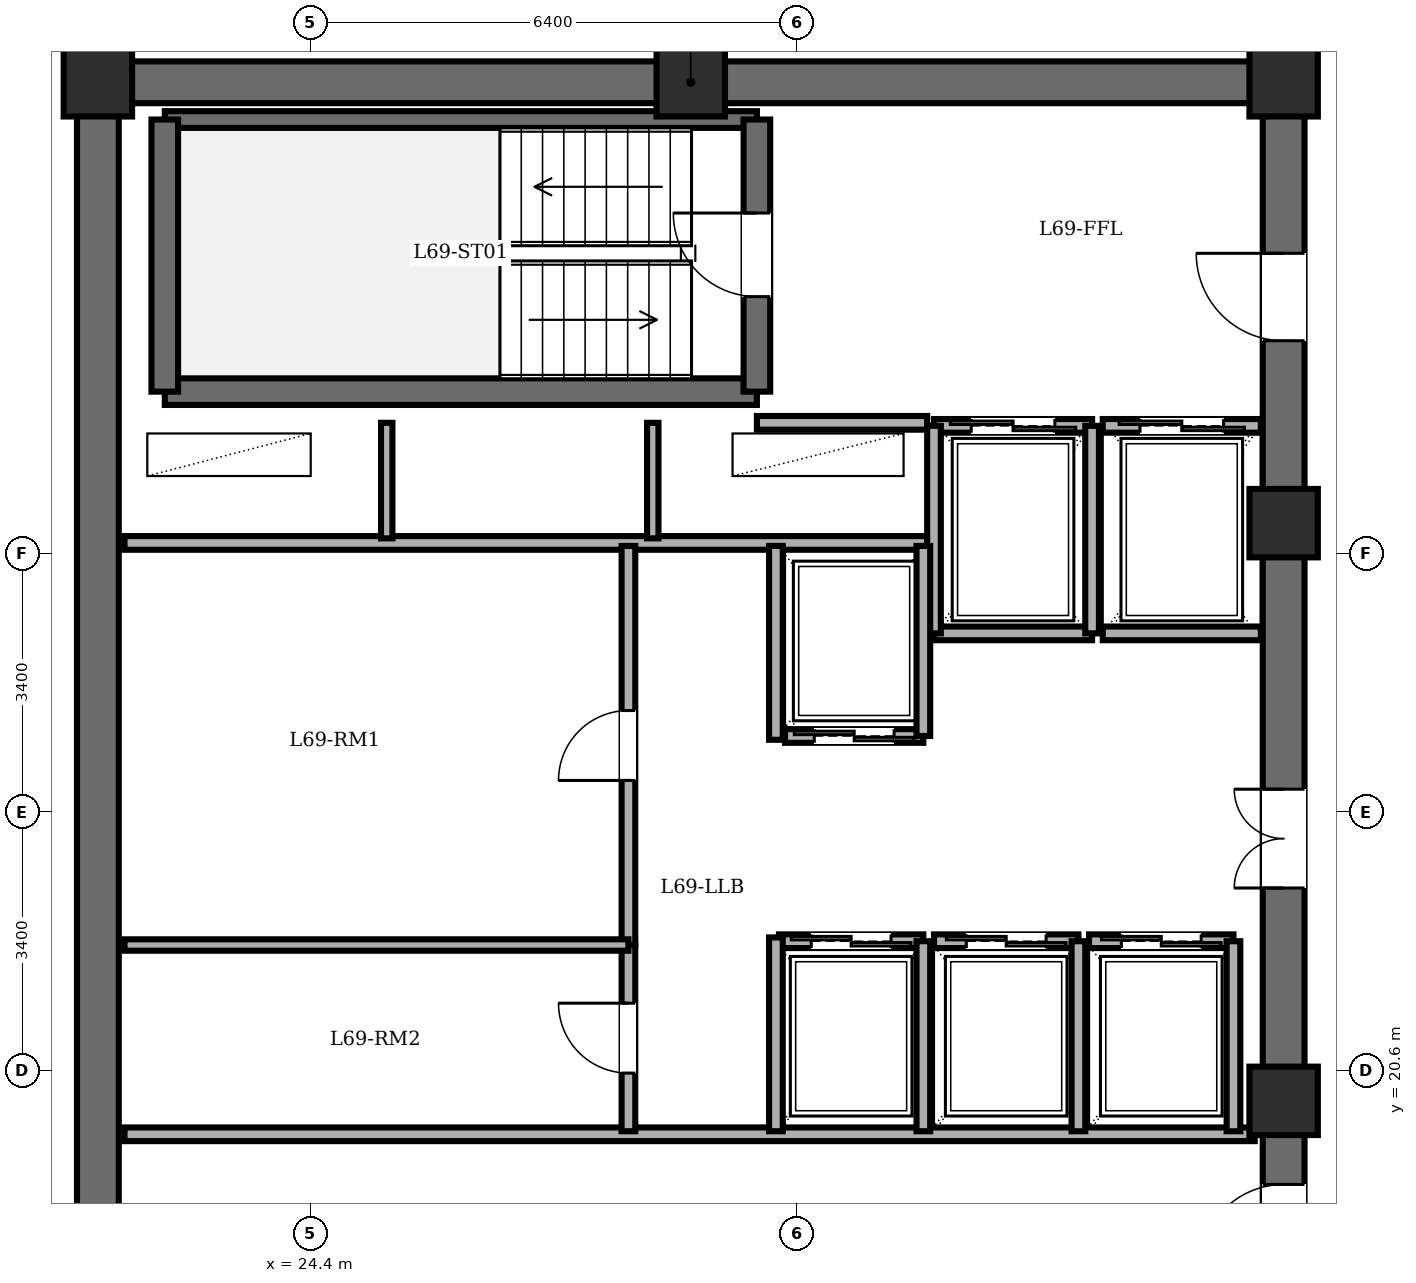
"""IFC4 building model, lengths in metres.
Left out: names, types, materials, properties, quantities, classifications, styles, units other than length and angle.
Written with IfcOpenShell. Run it as: python <this file> out.ifc"""

import sys

from ifc_helpers import new_model, si_unit, direction, frame, frame_2d, origin, origin_2d, place, context, subcontext, project, spatial, rectangle, extrude, element, fill, save


model = new_model("IFC4")
c1 = context("Model", 3, precision=1e-05, world=origin(), true_north=direction((0.0, 1.0)))
c2 = subcontext(c1, "Body", "Model", "MODEL_VIEW")
j1 = project(units=[si_unit("LENGTHUNIT", "METRE"), si_unit("PLANEANGLEUNIT", "RADIAN")], contexts=[c1])
p1 = place(None, origin())
s1 = spatial("IfcSite", under=j1, at=p1, CompositionType="ELEMENT")
p2 = place(p1, origin())
s2 = spatial("IfcBuilding", under=s1, at=p2, CompositionType="ELEMENT")
p3 = place(p2, frame((0.0, 0.0, 266.1)))
s3 = spatial("IfcBuildingStorey", under=s2, at=p3, CompositionType="ELEMENT", Elevation=266.1)
for number, where, z_axis, x_axis in (
    (1, (37.2, 20.2, 0.0), (0.0, 0.0, 1.0), (1.0, 0.0, 0.0)),
    (2, (37.2, 27.8, 0.0), (0.0, 0.0, 1.0), (1.0, 0.0, 0.0)),
    (3, (37.2, 33.6, 0.0), (0.0, 0.0, 1.0), (1.0, 0.0, 0.0)),
    (4, (29.4, 33.6, 0.0), (0.0, 0.0, 1.0), (1.0, 0.0, 0.0)),
    (5, (21.6, 33.6, 0.0), (0.0, 0.0, 1.0), (1.0, 0.0, 0.0)),
):
    element("IfcColumn", number, at=place(p3, frame(where, z_axis=z_axis, x_axis=x_axis)), inside=s3, PredefinedType="COLUMN", context=c2, shape_type="SweptSolid", body=[
        extrude(rectangle(XDim=0.9, YDim=0.9, at=origin_2d()), origin(), (0.0, 0.0, 1.0), 3.65),
    ])
p4 = place(p3, frame((21.6, 14.4, 0.0), z_axis=(0.0, 0.0, 1.0), x_axis=(0.0, 1.0, 0.0)))
e6 = element("IfcWall", 6, at=p4, inside=s3, PredefinedType="SHEAR", context=c2, shape_type="SweptSolid", body=[
    extrude(rectangle(XDim=19.2, YDim=0.55, at=frame_2d((9.6, 0.0))), origin(), (0.0, 0.0, 1.0), 3.45),
])
p5 = place(p3, frame((21.6, 33.6, 0.0), z_axis=(0.0, 0.0, 1.0), x_axis=(1.0, 0.0, 0.0)))
e7 = element("IfcWall", 7, at=p5, inside=s3, PredefinedType="SHEAR", context=c2, shape_type="SweptSolid", body=[
    extrude(rectangle(XDim=15.6, YDim=0.55, at=frame_2d((7.8, 0.0))), origin(), (0.0, 0.0, 1.0), 3.45),
])
p6 = place(p3, frame((37.2, 14.4, 0.0), z_axis=(0.0, 0.0, 1.0), x_axis=(0.0, 1.0, 0.0)))
e8 = element("IfcWall", 8, at=p6, inside=s3, PredefinedType="SHEAR", context=c2, shape_type="SweptSolid", body=[
    extrude(rectangle(XDim=19.2, YDim=0.55, at=frame_2d((9.6, 0.0))), origin(), (0.0, 0.0, 1.0), 3.45),
])
p7 = place(p6, frame((15.8, 0.0, 0.0)))
e9 = element("IfcOpeningElement", 9, at=p7, cuts=e8, PredefinedType="OPENING", context=c2, shape_type="SweptSolid", body=[
    extrude(rectangle(XDim=1.15, YDim=2.15, at=frame_2d((0.575, 1.075))), frame((0.0, 0.285, 0.0), z_axis=(0.0, -1.0, 0.0), x_axis=(1.0, 0.0, 0.0)), (0.0, 0.0, 1.0), 0.57),
])
p8 = place(p6, frame((3.6, 0.0, 0.0)))
e10 = element("IfcOpeningElement", 10, at=p8, cuts=e8, PredefinedType="OPENING", context=c2, shape_type="SweptSolid", body=[
    extrude(rectangle(XDim=1.1, YDim=2.15, at=frame_2d((0.55, 1.075))), frame((0.0, 0.285, 0.0), z_axis=(0.0, -1.0, 0.0), x_axis=(1.0, 0.0, 0.0)), (0.0, 0.0, 1.0), 0.57),
])
p9 = place(p6, frame((8.6, 0.0, 0.0)))
e11 = element("IfcOpeningElement", 11, at=p9, cuts=e8, PredefinedType="OPENING", context=c2, shape_type="SweptSolid", body=[
    extrude(rectangle(XDim=1.3, YDim=2.2, at=frame_2d((0.65, 1.1))), frame((0.0, 0.285, 0.0), z_axis=(0.0, -1.0, 0.0), x_axis=(1.0, 0.0, 0.0)), (0.0, 0.0, 1.0), 0.57),
])
p10 = place(p3, frame((22.48, 29.53, 0.0), z_axis=(0.0, 0.0, 1.0), x_axis=(1.0, 0.0, 0.0)))
e12 = element("IfcWall", 12, at=p10, inside=s3, PredefinedType="SOLIDWALL", context=c2, shape_type="SweptSolid", body=[
    extrude(rectangle(XDim=7.79, YDim=0.35, at=frame_2d((3.895, 0.0))), origin(), (0.0, 0.0, 1.0), 3.45),
])
p11 = place(p3, frame((22.48, 33.11, 0.0), z_axis=(0.0, 0.0, 1.0), x_axis=(1.0, 0.0, 0.0)))
e13 = element("IfcWall", 13, at=p11, inside=s3, PredefinedType="PARTITIONING", context=c2, shape_type="SweptSolid", body=[
    extrude(rectangle(XDim=7.79, YDim=0.22, at=frame_2d((3.895, 0.0))), origin(), (0.0, 0.0, 1.0), 3.45),
])
p12 = place(p3, frame((22.48, 29.53, 0.0), z_axis=(0.0, 0.0, 1.0), x_axis=(0.0, 1.0, 0.0)))
e14 = element("IfcWall", 14, at=p12, inside=s3, PredefinedType="SOLIDWALL", context=c2, shape_type="SweptSolid", body=[
    extrude(rectangle(XDim=3.58, YDim=0.35, at=frame_2d((1.79, 0.0))), origin(), (0.0, 0.0, 1.0), 3.45),
])
p13 = place(p3, frame((30.27, 29.53, 0.0), z_axis=(0.0, 0.0, 1.0), x_axis=(0.0, 1.0, 0.0)))
e15 = element("IfcWall", 15, at=p13, inside=s3, PredefinedType="SOLIDWALL", context=c2, shape_type="SweptSolid", body=[
    extrude(rectangle(XDim=3.58, YDim=0.35, at=frame_2d((1.79, 0.0))), origin(), (0.0, 0.0, 1.0), 3.45),
])
p14 = place(p13, frame((1.25, 0.0, 0.0)))
e16 = element("IfcOpeningElement", 16, at=p14, cuts=e15, PredefinedType="OPENING", context=c2, shape_type="SweptSolid", body=[
    extrude(rectangle(XDim=1.1, YDim=2.15, at=frame_2d((0.55, 1.075))), frame((0.0, 0.185, 0.0), z_axis=(0.0, -1.0, 0.0), x_axis=(1.0, 0.0, 0.0)), (0.0, 0.0, 1.0), 0.37),
])
p15 = place(p3, frame((30.27, 29.12, 0.0), z_axis=(0.0, 0.0, 1.0), x_axis=(1.0, 0.0, 0.0)))
e17 = element("IfcWall", 17, at=p15, inside=s3, PredefinedType="PARTITIONING", context=c2, shape_type="SweptSolid", body=[
    extrude(rectangle(XDim=2.24, YDim=0.18, at=frame_2d((1.12, 0.0))), origin(), (0.0, 0.0, 1.0), 3.45),
])
p16 = place(p3, frame((21.95, 27.54, 0.0), z_axis=(0.0, 0.0, 1.0), x_axis=(1.0, 0.0, 0.0)))
e18 = element("IfcWall", 18, at=p16, inside=s3, PredefinedType="PARTITIONING", context=c2, shape_type="SweptSolid", body=[
    extrude(rectangle(XDim=10.56, YDim=0.18, at=frame_2d((5.28, 0.0))), origin(), (0.0, 0.0, 1.0), 3.45),
])
for number, where, z_axis, x_axis in (
    (19, (25.4, 27.6, 0.0), (0.0, 0.0, 1.0), (0.0, 1.0, 0.0)),
    (20, (28.9, 27.6, 0.0), (0.0, 0.0, 1.0), (0.0, 1.0, 0.0)),
):
    element("IfcWall", number, at=place(p3, frame(where, z_axis=z_axis, x_axis=x_axis)), inside=s3, PredefinedType="PARTITIONING", context=c2, shape_type="SweptSolid", body=[
        extrude(rectangle(XDim=1.52, YDim=0.15, at=frame_2d((0.76, 0.0))), origin(), (0.0, 0.0, 1.0), 3.45),
    ])
p17 = place(p3, frame((21.95, 19.76, 0.0), z_axis=(0.0, 0.0, 1.0), x_axis=(1.0, 0.0, 0.0)))
e21 = element("IfcWall", 21, at=p17, inside=s3, PredefinedType="PARTITIONING", context=c2, shape_type="SweptSolid", body=[
    extrude(rectangle(XDim=14.87, YDim=0.18, at=frame_2d((7.435, 0.0))), origin(), (0.0, 0.0, 1.0), 3.45),
])
p18 = place(p3, frame((32.6, 29.08, 0.0), z_axis=(0.0, 0.0, 1.0), x_axis=(1.0, 0.0, 0.0)))
e22 = element("IfcWall", 22, at=p18, inside=s3, PredefinedType="PARTITIONING", context=c2, shape_type="SweptSolid", body=[
    extrude(rectangle(XDim=2.08, YDim=0.18, at=frame_2d((1.04, 0.0))), origin(), (0.0, 0.0, 1.0), 3.45),
])
p19 = place(p18, frame((0.49, 0.0, 0.0)))
e23 = element("IfcOpeningElement", 23, at=p19, cuts=e22, PredefinedType="OPENING", context=c2, shape_type="SweptSolid", body=[
    extrude(rectangle(XDim=1.1, YDim=2.2, at=frame_2d((0.55, 1.1))), frame((0.0, 0.1, 0.0), z_axis=(0.0, -1.0, 0.0), x_axis=(1.0, 0.0, 0.0)), (0.0, 0.0, 1.0), 0.2),
])
p20 = place(p3, frame((34.68, 26.35, 0.0), z_axis=(0.0, 0.0, 1.0), x_axis=(-1.0, 0.0, 0.0)))
e24 = element("IfcWall", 24, at=p20, inside=s3, PredefinedType="PARTITIONING", context=c2, shape_type="SweptSolid", body=[
    extrude(rectangle(XDim=2.08, YDim=0.18, at=frame_2d((1.04, 0.0))), origin(), (0.0, 0.0, 1.0), 3.45),
])
for number, where, z_axis, x_axis in (
    (25, (34.68, 26.35, 0.0), (0.0, 0.0, 1.0), (0.0, 1.0, 0.0)),
    (26, (32.6, 29.08, 0.0), (0.0, 0.0, 1.0), (0.0, -1.0, 0.0)),
):
    element("IfcWall", number, at=place(p3, frame(where, z_axis=z_axis, x_axis=x_axis)), inside=s3, PredefinedType="PARTITIONING", context=c2, shape_type="SweptSolid", body=[
        extrude(rectangle(XDim=2.73, YDim=0.18, at=frame_2d((1.365, 0.0))), origin(), (0.0, 0.0, 1.0), 3.45),
    ])
p21 = place(p3, frame((34.82, 29.08, 0.0), z_axis=(0.0, 0.0, 1.0), x_axis=(1.0, 0.0, 0.0)))
e27 = element("IfcWall", 27, at=p21, inside=s3, PredefinedType="PARTITIONING", context=c2, shape_type="SweptSolid", body=[
    extrude(rectangle(XDim=2.08, YDim=0.18, at=frame_2d((1.04, 0.0))), origin(), (0.0, 0.0, 1.0), 3.45),
])
p22 = place(p21, frame((0.49, 0.0, 0.0)))
e28 = element("IfcOpeningElement", 28, at=p22, cuts=e27, PredefinedType="OPENING", context=c2, shape_type="SweptSolid", body=[
    extrude(rectangle(XDim=1.1, YDim=2.2, at=frame_2d((0.55, 1.1))), frame((0.0, 0.1, 0.0), z_axis=(0.0, -1.0, 0.0), x_axis=(1.0, 0.0, 0.0)), (0.0, 0.0, 1.0), 0.2),
])
p23 = place(p3, frame((36.9, 26.35, 0.0), z_axis=(0.0, 0.0, 1.0), x_axis=(-1.0, 0.0, 0.0)))
e29 = element("IfcWall", 29, at=p23, inside=s3, PredefinedType="PARTITIONING", context=c2, shape_type="SweptSolid", body=[
    extrude(rectangle(XDim=2.08, YDim=0.18, at=frame_2d((1.04, 0.0))), origin(), (0.0, 0.0, 1.0), 3.45),
])
p24 = place(p3, frame((32.46, 25.0, 0.0), z_axis=(0.0, 0.0, 1.0), x_axis=(-1.0, 0.0, 0.0)))
e30 = element("IfcWall", 30, at=p24, inside=s3, PredefinedType="PARTITIONING", context=c2, shape_type="SweptSolid", body=[
    extrude(rectangle(XDim=1.82, YDim=0.18, at=frame_2d((0.91, 0.0))), origin(), (0.0, 0.0, 1.0), 3.45),
])
p25 = place(p24, frame((0.385, 0.0, 0.0)))
e31 = element("IfcOpeningElement", 31, at=p25, cuts=e30, PredefinedType="OPENING", context=c2, shape_type="SweptSolid", body=[
    extrude(rectangle(XDim=1.05, YDim=2.2, at=frame_2d((0.525, 1.1))), frame((0.0, 0.1, 0.0), z_axis=(0.0, -1.0, 0.0), x_axis=(1.0, 0.0, 0.0)), (0.0, 0.0, 1.0), 0.2),
])
p26 = place(p3, frame((32.46, 25.0, 0.0), z_axis=(0.0, 0.0, 1.0), x_axis=(0.0, 1.0, 0.0)))
e32 = element("IfcWall", 32, at=p26, inside=s3, PredefinedType="PARTITIONING", context=c2, shape_type="SweptSolid", body=[
    extrude(rectangle(XDim=2.5, YDim=0.18, at=frame_2d((1.25, 0.0))), origin(), (0.0, 0.0, 1.0), 3.45),
])
p27 = place(p3, frame((30.56, 22.3, 0.0), z_axis=(0.0, 0.0, 1.0), x_axis=(1.0, 0.0, 0.0)))
e33 = element("IfcWall", 33, at=p27, inside=s3, PredefinedType="PARTITIONING", context=c2, shape_type="SweptSolid", body=[
    extrude(rectangle(XDim=1.9, YDim=0.18, at=frame_2d((0.95, 0.0))), origin(), (0.0, 0.0, 1.0), 3.45),
])
p28 = place(p27, frame((0.425, 0.0, 0.0)))
e34 = element("IfcOpeningElement", 34, at=p28, cuts=e33, PredefinedType="OPENING", context=c2, shape_type="SweptSolid", body=[
    extrude(rectangle(XDim=1.05, YDim=2.2, at=frame_2d((0.525, 1.1))), frame((0.0, 0.1, 0.0), z_axis=(0.0, -1.0, 0.0), x_axis=(1.0, 0.0, 0.0)), (0.0, 0.0, 1.0), 0.2),
])
p29 = place(p3, frame((32.46, 19.8, 0.0), z_axis=(0.0, 0.0, 1.0), x_axis=(0.0, 1.0, 0.0)))
e35 = element("IfcWall", 35, at=p29, inside=s3, PredefinedType="PARTITIONING", context=c2, shape_type="SweptSolid", body=[
    extrude(rectangle(XDim=2.5, YDim=0.18, at=frame_2d((1.25, 0.0))), origin(), (0.0, 0.0, 1.0), 3.45),
])
p30 = place(p3, frame((32.6, 22.3, 0.0), z_axis=(0.0, 0.0, 1.0), x_axis=(1.0, 0.0, 0.0)))
e36 = element("IfcWall", 36, at=p30, inside=s3, PredefinedType="PARTITIONING", context=c2, shape_type="SweptSolid", body=[
    extrude(rectangle(XDim=1.9, YDim=0.18, at=frame_2d((0.95, 0.0))), origin(), (0.0, 0.0, 1.0), 3.45),
])
p31 = place(p30, frame((0.425, 0.0, 0.0)))
e37 = element("IfcOpeningElement", 37, at=p31, cuts=e36, PredefinedType="OPENING", context=c2, shape_type="SweptSolid", body=[
    extrude(rectangle(XDim=1.05, YDim=2.2, at=frame_2d((0.525, 1.1))), frame((0.0, 0.1, 0.0), z_axis=(0.0, -1.0, 0.0), x_axis=(1.0, 0.0, 0.0)), (0.0, 0.0, 1.0), 0.2),
])
p32 = place(p3, frame((34.5, 19.8, 0.0), z_axis=(0.0, 0.0, 1.0), x_axis=(0.0, 1.0, 0.0)))
e38 = element("IfcWall", 38, at=p32, inside=s3, PredefinedType="PARTITIONING", context=c2, shape_type="SweptSolid", body=[
    extrude(rectangle(XDim=2.5, YDim=0.18, at=frame_2d((1.25, 0.0))), origin(), (0.0, 0.0, 1.0), 3.45),
])
p33 = place(p3, frame((34.64, 22.3, 0.0), z_axis=(0.0, 0.0, 1.0), x_axis=(1.0, 0.0, 0.0)))
e39 = element("IfcWall", 39, at=p33, inside=s3, PredefinedType="PARTITIONING", context=c2, shape_type="SweptSolid", body=[
    extrude(rectangle(XDim=1.9, YDim=0.18, at=frame_2d((0.95, 0.0))), origin(), (0.0, 0.0, 1.0), 3.45),
])
p34 = place(p33, frame((0.425, 0.0, 0.0)))
e40 = element("IfcOpeningElement", 40, at=p34, cuts=e39, PredefinedType="OPENING", context=c2, shape_type="SweptSolid", body=[
    extrude(rectangle(XDim=1.05, YDim=2.2, at=frame_2d((0.525, 1.1))), frame((0.0, 0.1, 0.0), z_axis=(0.0, -1.0, 0.0), x_axis=(1.0, 0.0, 0.0)), (0.0, 0.0, 1.0), 0.2),
])
p35 = place(p3, frame((36.54, 19.8, 0.0), z_axis=(0.0, 0.0, 1.0), x_axis=(0.0, 1.0, 0.0)))
e41 = element("IfcWall", 41, at=p35, inside=s3, PredefinedType="PARTITIONING", context=c2, shape_type="SweptSolid", body=[
    extrude(rectangle(XDim=2.5, YDim=0.18, at=frame_2d((1.25, 0.0))), origin(), (0.0, 0.0, 1.0), 3.45),
])
for number, where, z_axis, x_axis in (
    (42, (30.52, 24.95, 0.0), (0.0, 0.0, 1.0), (0.0, 1.0, 0.0)),
    (43, (30.52, 19.8, 0.0), (0.0, 0.0, 1.0), (0.0, 1.0, 0.0)),
):
    element("IfcWall", number, at=place(p3, frame(where, z_axis=z_axis, x_axis=x_axis)), inside=s3, PredefinedType="PARTITIONING", context=c2, shape_type="SweptSolid", body=[
        extrude(rectangle(XDim=2.55, YDim=0.18, at=frame_2d((1.275, 0.0))), origin(), (0.0, 0.0, 1.0), 3.45),
    ])
p36 = place(p3, frame((28.58, 22.25, 0.0), z_axis=(0.0, 0.0, 1.0), x_axis=(0.0, 1.0, 0.0)))
e44 = element("IfcWall", 44, at=p36, inside=s3, PredefinedType="PARTITIONING", context=c2, shape_type="SweptSolid", body=[
    extrude(rectangle(XDim=5.25, YDim=0.18, at=frame_2d((2.625, 0.0))), origin(), (0.0, 0.0, 1.0), 3.45),
])
p37 = place(p36, frame((2.165, 0.0, 0.0)))
e45 = element("IfcOpeningElement", 45, at=p37, cuts=e44, PredefinedType="OPENING", context=c2, shape_type="SweptSolid", body=[
    extrude(rectangle(XDim=0.92, YDim=2.1, at=frame_2d((0.46, 1.05))), frame((0.0, 0.1, 0.0), z_axis=(0.0, -1.0, 0.0), x_axis=(1.0, 0.0, 0.0)), (0.0, 0.0, 1.0), 0.2),
])
p38 = place(p3, frame((28.58, 19.8, 0.0), z_axis=(0.0, 0.0, 1.0), x_axis=(0.0, 1.0, 0.0)))
e46 = element("IfcWall", 46, at=p38, inside=s3, PredefinedType="PARTITIONING", context=c2, shape_type="SweptSolid", body=[
    extrude(rectangle(XDim=2.45, YDim=0.18, at=frame_2d((1.225, 0.0))), origin(), (0.0, 0.0, 1.0), 3.45),
])
p39 = place(p38, frame((0.765, 0.0, 0.0)))
e47 = element("IfcOpeningElement", 47, at=p39, cuts=e46, PredefinedType="OPENING", context=c2, shape_type="SweptSolid", body=[
    extrude(rectangle(XDim=0.92, YDim=2.1, at=frame_2d((0.46, 1.05))), frame((0.0, 0.1, 0.0), z_axis=(0.0, -1.0, 0.0), x_axis=(1.0, 0.0, 0.0)), (0.0, 0.0, 1.0), 0.2),
])
p40 = place(p3, frame((21.95, 22.25, 0.0), z_axis=(0.0, 0.0, 1.0), x_axis=(1.0, 0.0, 0.0)))
e48 = element("IfcWall", 48, at=p40, inside=s3, PredefinedType="PARTITIONING", context=c2, shape_type="SweptSolid", body=[
    extrude(rectangle(XDim=6.63, YDim=0.15, at=frame_2d((3.315, 0.0))), origin(), (0.0, 0.0, 1.0), 3.45),
])
p41 = place(p14, origin())
e49 = element("IfcDoor", 49, at=p41, inside=s3, OperationType="SINGLE_SWING_RIGHT", PredefinedType="DOOR", context=c2, shape_type="SweptSolid", body=[
    extrude(rectangle(XDim=1.1, YDim=2.15, at=frame_2d((0.55, 1.075))), frame((0.0, 0.025, 0.0), z_axis=(0.0, -1.0, 0.0), x_axis=(1.0, 0.0, 0.0)), (0.0, 0.0, 1.0), 0.05),
])
fill(e16, e49)
p42 = place(p7, origin())
e50 = element("IfcDoor", 50, at=p42, inside=s3, OperationType="SINGLE_SWING_RIGHT", PredefinedType="DOOR", context=c2, shape_type="SweptSolid", body=[
    extrude(rectangle(XDim=1.15, YDim=2.15, at=frame_2d((0.575, 1.075))), frame((0.0, 0.025, 0.0), z_axis=(0.0, -1.0, 0.0), x_axis=(1.0, 0.0, 0.0)), (0.0, 0.0, 1.0), 0.05),
])
fill(e9, e50)
p43 = place(p8, origin())
e51 = element("IfcDoor", 51, at=p43, inside=s3, OperationType="SINGLE_SWING_LEFT", PredefinedType="DOOR", context=c2, shape_type="SweptSolid", body=[
    extrude(rectangle(XDim=1.1, YDim=2.15, at=frame_2d((0.55, 1.075))), frame((0.0, 0.025, 0.0), z_axis=(0.0, -1.0, 0.0), x_axis=(1.0, 0.0, 0.0)), (0.0, 0.0, 1.0), 0.05),
])
fill(e10, e51)
p44 = place(p19, origin())
e52 = element("IfcDoor", 52, at=p44, inside=s3, OperationType="DOUBLE_DOOR_SLIDING", PredefinedType="DOOR", context=c2, shape_type="SweptSolid", body=[
    extrude(rectangle(XDim=1.1, YDim=2.2, at=frame_2d((0.55, 1.1))), frame((0.0, 0.025, 0.0), z_axis=(0.0, -1.0, 0.0), x_axis=(1.0, 0.0, 0.0)), (0.0, 0.0, 1.0), 0.05),
])
fill(e23, e52)
p45 = place(p22, origin())
e53 = element("IfcDoor", 53, at=p45, inside=s3, OperationType="DOUBLE_DOOR_SLIDING", PredefinedType="DOOR", context=c2, shape_type="SweptSolid", body=[
    extrude(rectangle(XDim=1.1, YDim=2.2, at=frame_2d((0.55, 1.1))), frame((0.0, 0.025, 0.0), z_axis=(0.0, -1.0, 0.0), x_axis=(1.0, 0.0, 0.0)), (0.0, 0.0, 1.0), 0.05),
])
fill(e28, e53)
p46 = place(p25, origin())
e54 = element("IfcDoor", 54, at=p46, inside=s3, OperationType="DOUBLE_DOOR_SLIDING", PredefinedType="DOOR", context=c2, shape_type="SweptSolid", body=[
    extrude(rectangle(XDim=1.05, YDim=2.2, at=frame_2d((0.525, 1.1))), frame((0.0, 0.025, 0.0), z_axis=(0.0, -1.0, 0.0), x_axis=(1.0, 0.0, 0.0)), (0.0, 0.0, 1.0), 0.05),
])
fill(e31, e54)
p47 = place(p28, origin())
e55 = element("IfcDoor", 55, at=p47, inside=s3, OperationType="DOUBLE_DOOR_SLIDING", PredefinedType="DOOR", context=c2, shape_type="SweptSolid", body=[
    extrude(rectangle(XDim=1.05, YDim=2.2, at=frame_2d((0.525, 1.1))), frame((0.0, 0.025, 0.0), z_axis=(0.0, -1.0, 0.0), x_axis=(1.0, 0.0, 0.0)), (0.0, 0.0, 1.0), 0.05),
])
fill(e34, e55)
p48 = place(p31, origin())
e56 = element("IfcDoor", 56, at=p48, inside=s3, OperationType="DOUBLE_DOOR_SLIDING", PredefinedType="DOOR", context=c2, shape_type="SweptSolid", body=[
    extrude(rectangle(XDim=1.05, YDim=2.2, at=frame_2d((0.525, 1.1))), frame((0.0, 0.025, 0.0), z_axis=(0.0, -1.0, 0.0), x_axis=(1.0, 0.0, 0.0)), (0.0, 0.0, 1.0), 0.05),
])
fill(e37, e56)
p49 = place(p34, origin())
e57 = element("IfcDoor", 57, at=p49, inside=s3, OperationType="DOUBLE_DOOR_SLIDING", PredefinedType="DOOR", context=c2, shape_type="SweptSolid", body=[
    extrude(rectangle(XDim=1.05, YDim=2.2, at=frame_2d((0.525, 1.1))), frame((0.0, 0.025, 0.0), z_axis=(0.0, -1.0, 0.0), x_axis=(1.0, 0.0, 0.0)), (0.0, 0.0, 1.0), 0.05),
])
fill(e40, e57)
p50 = place(p37, origin())
e58 = element("IfcDoor", 58, at=p50, inside=s3, OperationType="SINGLE_SWING_LEFT", PredefinedType="DOOR", context=c2, shape_type="SweptSolid", body=[
    extrude(rectangle(XDim=0.92, YDim=2.1, at=frame_2d((0.46, 1.05))), frame((0.0, 0.025, 0.0), z_axis=(0.0, -1.0, 0.0), x_axis=(1.0, 0.0, 0.0)), (0.0, 0.0, 1.0), 0.05),
])
fill(e45, e58)
p51 = place(p39, origin())
e59 = element("IfcDoor", 59, at=p51, inside=s3, OperationType="SINGLE_SWING_RIGHT", PredefinedType="DOOR", context=c2, shape_type="SweptSolid", body=[
    extrude(rectangle(XDim=0.92, YDim=2.1, at=frame_2d((0.46, 1.05))), frame((0.0, 0.025, 0.0), z_axis=(0.0, -1.0, 0.0), x_axis=(1.0, 0.0, 0.0)), (0.0, 0.0, 1.0), 0.05),
])
fill(e47, e59)
p52 = place(p9, origin())
e60 = element("IfcDoor", 60, at=p52, inside=s3, OperationType="DOUBLE_DOOR_SINGLE_SWING", PredefinedType="DOOR", context=c2, shape_type="SweptSolid", body=[
    extrude(rectangle(XDim=1.3, YDim=2.2, at=frame_2d((0.65, 1.1))), frame((0.0, 0.025, 0.0), z_axis=(0.0, -1.0, 0.0), x_axis=(1.0, 0.0, 0.0)), (0.0, 0.0, 1.0), 0.05),
])
fill(e11, e60)
save(model, sys.argv[1])
